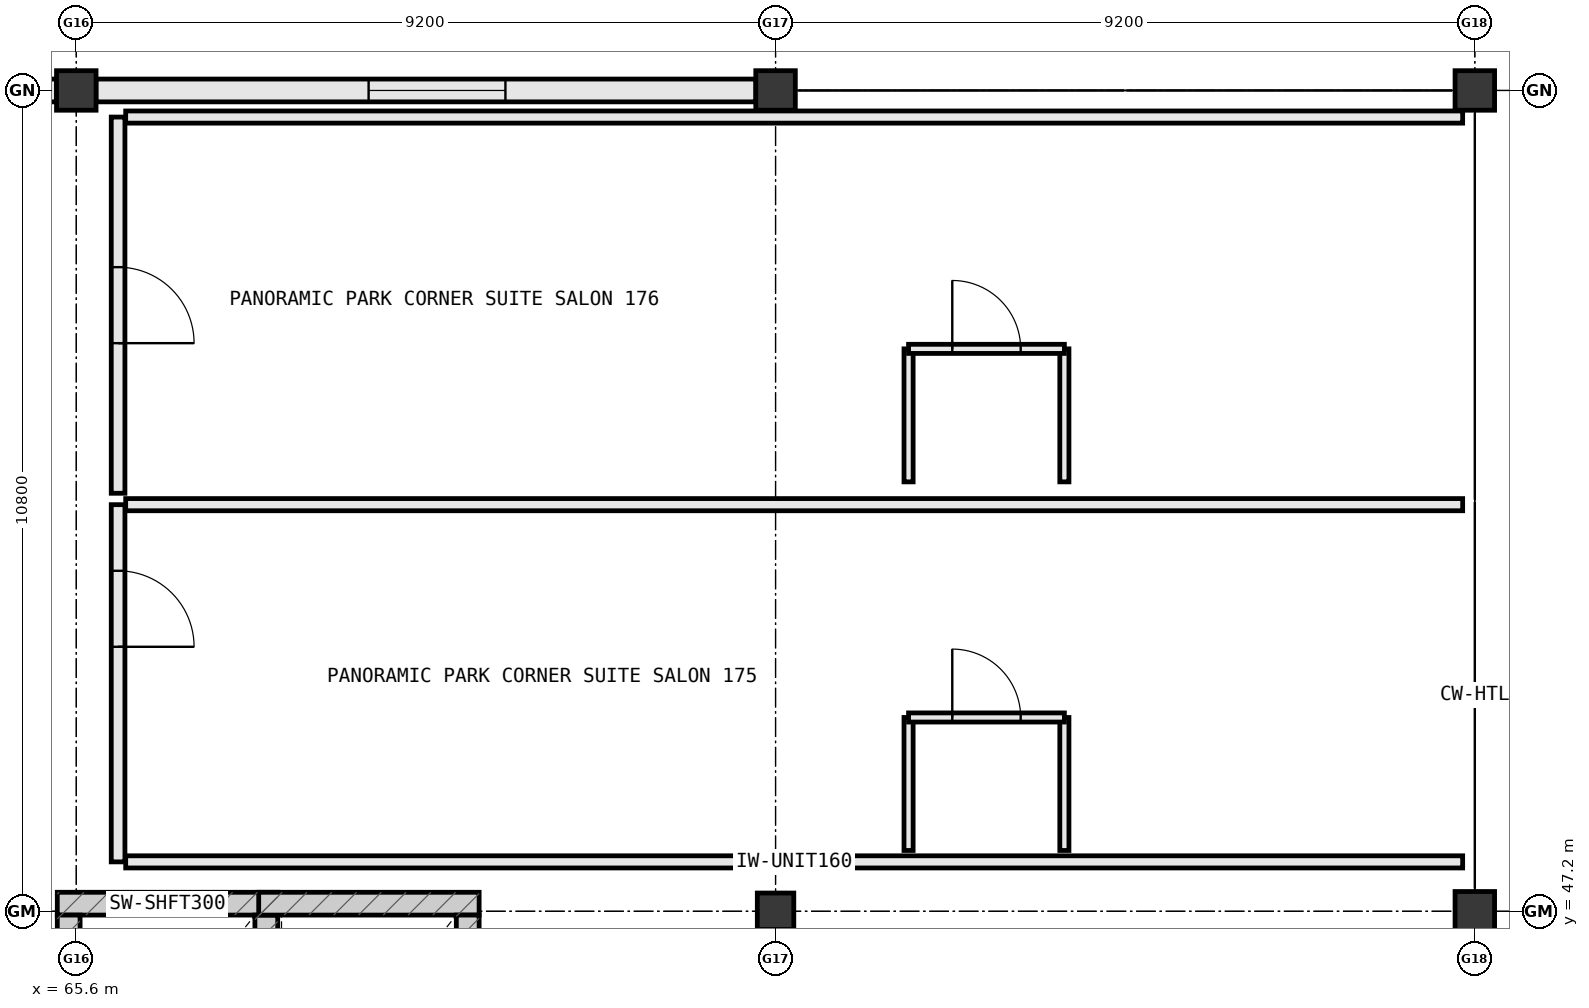
"""IFC4 building model, lengths in metres.
Left out: names, types, materials, properties, quantities, classifications, styles, units other than length and angle.
Written with IfcOpenShell. Run it as: python <this file> out.ifc"""

import sys

from ifc_helpers import new_model, si_unit, direction, frame, frame_2d, origin, origin_2d, place, context, subcontext, project, spatial, rectangle, extrude, element, fill, save


model = new_model("IFC4")
c1 = context("Model", 3, precision=1e-05, world=origin(), true_north=direction((0.0, 1.0)))
c2 = subcontext(c1, "Body", "Model", "MODEL_VIEW")
j1 = project(units=[si_unit("LENGTHUNIT", "METRE"), si_unit("PLANEANGLEUNIT", "RADIAN")], contexts=[c1])
p1 = place(None, origin())
s1 = spatial("IfcSite", under=j1, at=p1, CompositionType="ELEMENT")
p2 = place(p1, origin())
s2 = spatial("IfcBuilding", under=s1, at=p2, CompositionType="ELEMENT")
p3 = place(p2, frame((0.0, 0.0, 23.8)))
s3 = spatial("IfcBuildingStorey", under=s2, at=p3, CompositionType="ELEMENT", Elevation=23.8)
p4 = place(p3, frame((74.8, 47.2, 0.0), z_axis=(0.0, 0.0, 1.0), x_axis=(1.0, 0.0, 0.0)))
e1 = element("IfcColumn", 1, at=p4, inside=s3, PredefinedType="COLUMN", context=c2, shape_type="SweptSolid", body=[
    extrude(rectangle(XDim=0.48, YDim=0.48, at=origin_2d()), origin(), (0.0, 0.0, 1.0), 3.8),
])
for number, where, z_axis, x_axis in (
    (2, (74.8, 58.0, 0.0), (0.0, 0.0, 1.0), (1.0, 0.0, 0.0)),
    (3, (84.0, 47.2, 0.0), (0.0, 0.0, 1.0), (1.0, 0.0, 0.0)),
    (4, (84.0, 58.0, 0.0), (0.0, 0.0, 1.0), (1.0, 0.0, 0.0)),
    (5, (65.6, 58.0, 0.0), (0.0, 0.0, 1.0), (1.0, 0.0, 0.0)),
):
    element("IfcColumn", number, at=place(p3, frame(where, z_axis=z_axis, x_axis=x_axis)), inside=s3, PredefinedType="COLUMN", context=c2, shape_type="SweptSolid", body=[
        extrude(rectangle(XDim=0.52, YDim=0.52, at=origin_2d()), origin(), (0.0, 0.0, 1.0), 3.8),
    ])
p5 = place(p3, frame((74.542, 58.0, 0.0), z_axis=(0.0, 0.0, 1.0), x_axis=(-1.0, 0.0, 0.0)))
e6 = element("IfcWall", 6, at=p5, inside=s3, PredefinedType="STANDARD", context=c2, shape_type="SweptSolid", body=[
    extrude(rectangle(XDim=8.684, YDim=0.3, at=frame_2d((4.342, 0.0))), origin(), (0.0, 0.0, 1.0), 2.865),
])
p6 = place(p5, frame((3.296, 0.0, 0.85)))
e7 = element("IfcOpeningElement", 7, at=p6, cuts=e6, PredefinedType="OPENING", context=c2, shape_type="SweptSolid", body=[
    extrude(rectangle(XDim=1.8, YDim=1.85, at=frame_2d((0.9, 0.925))), frame((0.0, 0.162, 0.0), z_axis=(0.0, -1.0, 0.0), x_axis=(1.0, 0.0, 0.0)), (0.0, 0.0, 1.0), 0.324),
])
p7 = place(p3, frame((65.342, 58.0, 0.0), z_axis=(0.0, 0.0, 1.0), x_axis=(-1.0, 0.0, 0.0)))
e8 = element("IfcWall", 8, at=p7, inside=s3, PredefinedType="STANDARD", context=c2, shape_type="SweptSolid", body=[
    extrude(rectangle(XDim=4.284, YDim=0.3, at=frame_2d((2.142, 0.0))), origin(), (0.0, 0.0, 1.0), 2.865),
])
p8 = place(p7, frame((1.242, 0.0, 0.85)))
e9 = element("IfcOpeningElement", 9, at=p8, cuts=e8, PredefinedType="OPENING", context=c2, shape_type="SweptSolid", body=[
    extrude(rectangle(XDim=1.8, YDim=1.85, at=frame_2d((0.9, 0.925))), frame((0.0, 0.162, 0.0), z_axis=(0.0, -1.0, 0.0), x_axis=(1.0, 0.0, 0.0)), (0.0, 0.0, 1.0), 0.324),
])
for number, where, z_axis, x_axis in (
    (10, (68.25, 47.3, 0.0), (0.0, 0.0, 1.0), (-1.0, 0.0, 0.0)),
    (11, (68.1, 44.25, 0.0), (0.0, 0.0, 1.0), (0.0, 1.0, 0.0)),
    (12, (65.5, 47.15, 0.0), (0.0, 0.0, 1.0), (0.0, -1.0, 0.0)),
    (13, (70.9, 47.3, 0.0), (0.0, 0.0, 1.0), (-1.0, 0.0, 0.0)),
    (14, (70.75, 44.25, 0.0), (0.0, 0.0, 1.0), (0.0, 1.0, 0.0)),
):
    element("IfcWall", number, at=place(p3, frame(where, z_axis=z_axis, x_axis=x_axis)), inside=s3, PredefinedType="SHEAR", context=c2, shape_type="SweptSolid", body=[
        extrude(rectangle(XDim=2.9, YDim=0.3, at=frame_2d((1.45, 0.0))), origin(), (0.0, 0.0, 1.0), 3.8),
    ])
p9 = place(p3, frame((66.15, 52.55, 0.0), z_axis=(0.0, 0.0, 1.0), x_axis=(0.0, -1.0, 0.0)))
e15 = element("IfcWall", 15, at=p9, inside=s3, PredefinedType="PARTITIONING", context=c2, shape_type="SweptSolid", body=[
    extrude(rectangle(XDim=4.7, YDim=0.18, at=frame_2d((2.35, 0.0))), origin(), (0.0, 0.0, 1.0), 3.55),
])
p10 = place(p9, frame((0.87, 0.0, 0.0)))
e16 = element("IfcOpeningElement", 16, at=p10, cuts=e15, PredefinedType="OPENING", context=c2, shape_type="SweptSolid", body=[
    extrude(rectangle(XDim=1.0, YDim=2.2, at=frame_2d((0.5, 1.1))), frame((0.0, 0.102, 0.0), z_axis=(0.0, -1.0, 0.0), x_axis=(1.0, 0.0, 0.0)), (0.0, 0.0, 1.0), 0.204),
])
for number, where, z_axis, x_axis in (
    (17, (66.25, 47.85, 0.0), (0.0, 0.0, 1.0), (1.0, 0.0, 0.0)),
    (18, (66.25, 52.55, 0.0), (0.0, 0.0, 1.0), (1.0, 0.0, 0.0)),
):
    element("IfcWall", number, at=place(p3, frame(where, z_axis=z_axis, x_axis=x_axis)), inside=s3, PredefinedType="PARTITIONING", context=c2, shape_type="SweptSolid", body=[
        extrude(rectangle(XDim=17.59, YDim=0.16, at=frame_2d((8.795, 0.0))), origin(), (0.0, 0.0, 1.0), 3.55),
    ])
for number, where, z_axis, x_axis in (
    (19, (76.55, 48.0, 0.0), (0.0, 0.0, 1.0), (0.0, 1.0, 0.0)),
    (20, (78.6, 48.0, 0.0), (0.0, 0.0, 1.0), (0.0, 1.0, 0.0)),
):
    element("IfcWall", number, at=place(p3, frame(where, z_axis=z_axis, x_axis=x_axis)), inside=s3, PredefinedType="PARTITIONING", context=c2, shape_type="SweptSolid", body=[
        extrude(rectangle(XDim=1.75, YDim=0.12, at=frame_2d((0.875, 0.0))), origin(), (0.0, 0.0, 1.0), 3.55),
    ])
p11 = place(p3, frame((76.55, 49.75, 0.0), z_axis=(0.0, 0.0, 1.0), x_axis=(1.0, 0.0, 0.0)))
e21 = element("IfcWall", 21, at=p11, inside=s3, PredefinedType="PARTITIONING", context=c2, shape_type="SweptSolid", body=[
    extrude(rectangle(XDim=2.05, YDim=0.12, at=frame_2d((1.025, 0.0))), origin(), (0.0, 0.0, 1.0), 3.55),
])
p12 = place(p11, frame((0.575, 0.0, 0.0)))
e22 = element("IfcOpeningElement", 22, at=p12, cuts=e21, PredefinedType="OPENING", context=c2, shape_type="SweptSolid", body=[
    extrude(rectangle(XDim=0.9, YDim=2.15, at=frame_2d((0.45, 1.075))), frame((0.0, 0.072, 0.0), z_axis=(0.0, -1.0, 0.0), x_axis=(1.0, 0.0, 0.0)), (0.0, 0.0, 1.0), 0.144),
])
p13 = place(p3, frame((66.15, 57.65, 0.0), z_axis=(0.0, 0.0, 1.0), x_axis=(0.0, -1.0, 0.0)))
e23 = element("IfcWall", 23, at=p13, inside=s3, PredefinedType="PARTITIONING", context=c2, shape_type="SweptSolid", body=[
    extrude(rectangle(XDim=4.95, YDim=0.18, at=frame_2d((2.475, 0.0))), origin(), (0.0, 0.0, 1.0), 3.55),
])
p14 = place(p13, frame((1.975, 0.0, 0.0)))
e24 = element("IfcOpeningElement", 24, at=p14, cuts=e23, PredefinedType="OPENING", context=c2, shape_type="SweptSolid", body=[
    extrude(rectangle(XDim=1.0, YDim=2.2, at=frame_2d((0.5, 1.1))), frame((0.0, 0.102, 0.0), z_axis=(0.0, -1.0, 0.0), x_axis=(1.0, 0.0, 0.0)), (0.0, 0.0, 1.0), 0.204),
])
p15 = place(p3, frame((66.25, 57.65, 0.0), z_axis=(0.0, 0.0, 1.0), x_axis=(1.0, 0.0, 0.0)))
e25 = element("IfcWall", 25, at=p15, inside=s3, PredefinedType="PARTITIONING", context=c2, shape_type="SweptSolid", body=[
    extrude(rectangle(XDim=17.59, YDim=0.16, at=frame_2d((8.795, 0.0))), origin(), (0.0, 0.0, 1.0), 2.865),
])
for number, where, z_axis, x_axis in (
    (26, (76.55, 52.85, 0.0), (0.0, 0.0, 1.0), (0.0, 1.0, 0.0)),
    (27, (78.6, 52.85, 0.0), (0.0, 0.0, 1.0), (0.0, 1.0, 0.0)),
):
    element("IfcWall", number, at=place(p3, frame(where, z_axis=z_axis, x_axis=x_axis)), inside=s3, PredefinedType="PARTITIONING", context=c2, shape_type="SweptSolid", body=[
        extrude(rectangle(XDim=1.75, YDim=0.12, at=frame_2d((0.875, 0.0))), origin(), (0.0, 0.0, 1.0), 3.55),
    ])
p16 = place(p3, frame((76.55, 54.6, 0.0), z_axis=(0.0, 0.0, 1.0), x_axis=(1.0, 0.0, 0.0)))
e28 = element("IfcWall", 28, at=p16, inside=s3, PredefinedType="PARTITIONING", context=c2, shape_type="SweptSolid", body=[
    extrude(rectangle(XDim=2.05, YDim=0.12, at=frame_2d((1.025, 0.0))), origin(), (0.0, 0.0, 1.0), 3.55),
])
p17 = place(p16, frame((0.575, 0.0, 0.0)))
e29 = element("IfcOpeningElement", 29, at=p17, cuts=e28, PredefinedType="OPENING", context=c2, shape_type="SweptSolid", body=[
    extrude(rectangle(XDim=0.9, YDim=2.15, at=frame_2d((0.45, 1.075))), frame((0.0, 0.072, 0.0), z_axis=(0.0, -1.0, 0.0), x_axis=(1.0, 0.0, 0.0)), (0.0, 0.0, 1.0), 0.144),
])
p18 = place(p6, origin())
e30 = element("IfcWindow", 30, at=p18, inside=s3, PartitioningType="SINGLE_PANEL", PredefinedType="WINDOW", context=c2, shape_type="SweptSolid", body=[
    extrude(rectangle(XDim=1.8, YDim=1.85, at=frame_2d((0.9, 0.925))), frame((0.0, 0.03, 0.0), z_axis=(0.0, -1.0, 0.0), x_axis=(1.0, 0.0, 0.0)), (0.0, 0.0, 1.0), 0.06),
])
fill(e7, e30)
p19 = place(p10, origin())
e31 = element("IfcDoor", 31, at=p19, inside=s3, OperationType="SINGLE_SWING_RIGHT", PredefinedType="DOOR", context=c2, shape_type="SweptSolid", body=[
    extrude(rectangle(XDim=1.0, YDim=2.2, at=frame_2d((0.5, 1.1))), frame((0.0, 0.025, 0.0), z_axis=(0.0, -1.0, 0.0), x_axis=(1.0, 0.0, 0.0)), (0.0, 0.0, 1.0), 0.05),
])
fill(e16, e31)
p20 = place(p12, origin())
e32 = element("IfcDoor", 32, at=p20, inside=s3, OperationType="SINGLE_SWING_LEFT", PredefinedType="DOOR", context=c2, shape_type="SweptSolid", body=[
    extrude(rectangle(XDim=0.9, YDim=2.15, at=frame_2d((0.45, 1.075))), frame((0.0, 0.025, 0.0), z_axis=(0.0, -1.0, 0.0), x_axis=(1.0, 0.0, 0.0)), (0.0, 0.0, 1.0), 0.05),
])
fill(e22, e32)
p21 = place(p14, origin())
e33 = element("IfcDoor", 33, at=p21, inside=s3, OperationType="SINGLE_SWING_RIGHT", PredefinedType="DOOR", context=c2, shape_type="SweptSolid", body=[
    extrude(rectangle(XDim=1.0, YDim=2.2, at=frame_2d((0.5, 1.1))), frame((0.0, 0.025, 0.0), z_axis=(0.0, -1.0, 0.0), x_axis=(1.0, 0.0, 0.0)), (0.0, 0.0, 1.0), 0.05),
])
fill(e24, e33)
p22 = place(p17, origin())
e34 = element("IfcDoor", 34, at=p22, inside=s3, OperationType="SINGLE_SWING_LEFT", PredefinedType="DOOR", context=c2, shape_type="SweptSolid", body=[
    extrude(rectangle(XDim=0.9, YDim=2.15, at=frame_2d((0.45, 1.075))), frame((0.0, 0.025, 0.0), z_axis=(0.0, -1.0, 0.0), x_axis=(1.0, 0.0, 0.0)), (0.0, 0.0, 1.0), 0.05),
])
fill(e29, e34)
save(model, sys.argv[1])
